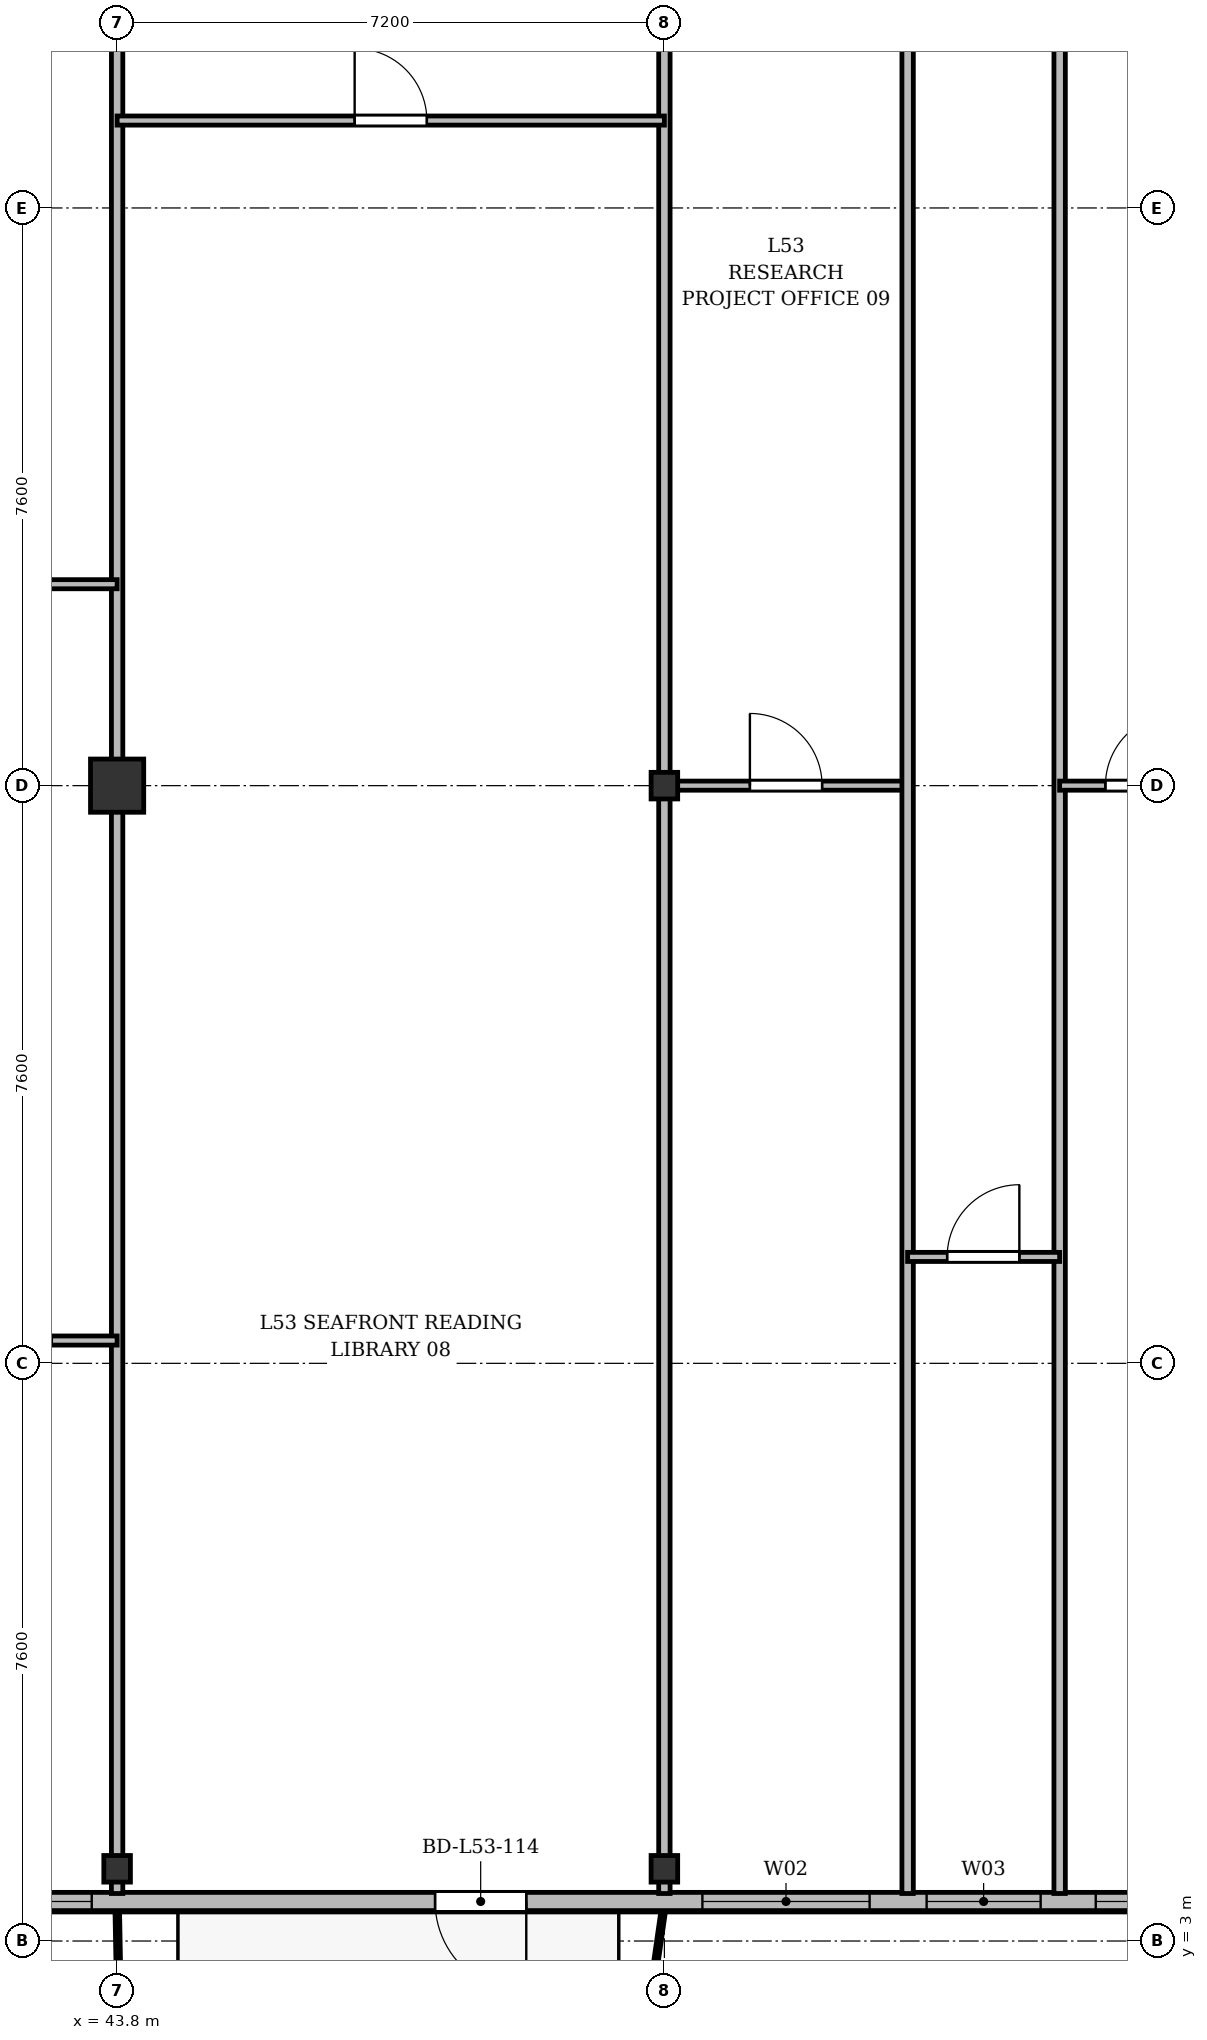
"""IFC4 building model, lengths in metres.
Left out: names, types, materials, properties, quantities, classifications, styles, units other than length and angle.
Written with IfcOpenShell. Run it as: python <this file> out.ifc"""

import sys

from ifc_helpers import new_model, si_unit, direction, frame, frame_2d, origin, origin_2d, place, context, subcontext, project, spatial, rectangle, i_section, extrude, source, transform, mapped, element, fill, save


model = new_model("IFC4")
c1 = context("Model", 3, precision=1e-05, world=origin(), true_north=direction((0.0, 1.0)))
c2 = subcontext(c1, "Body", "Model", "MODEL_VIEW")
j1 = project(units=[si_unit("LENGTHUNIT", "METRE"), si_unit("PLANEANGLEUNIT", "RADIAN")], contexts=[c1])
p1 = place(None, origin())
s1 = spatial("IfcSite", under=j1, at=p1, CompositionType="ELEMENT")
p2 = place(p1, origin())
s2 = spatial("IfcBuilding", under=s1, at=p2, CompositionType="ELEMENT")
p3 = place(p2, frame((0.0, 0.0, 204.9)))
s3 = spatial("IfcBuildingStorey", under=s2, at=p3, CompositionType="ELEMENT", Elevation=204.9)
m1 = source(origin(), c2, "Body", "SweptSolid", [
    extrude(i_section(OverallWidth=0.35, OverallDepth=0.35, WebThickness=0.018, FlangeThickness=0.028, at=origin_2d()), origin(), (0.0, 0.0, 1.0), 3.6),
])
p4 = place(p3, frame((43.8, 3.95, 0.0), z_axis=(0.0, 0.0, 1.0), x_axis=(1.0, 0.0, 0.0)))
e1 = element("IfcColumn", 1, at=p4, inside=s3, PredefinedType="COLUMN", context=c2, shape_type="MappedRepresentation", body=[
    mapped(m1, transform((0.0, 0.0, 0.0), x_axis=(1.0, 0.0, 0.0), y_axis=(0.0, 1.0, 0.0), z_axis=(0.0, 0.0, 1.0), scale=1.0)),
])
m2 = source(origin(), c2, "Body", "SweptSolid", [
    extrude(rectangle(XDim=0.7, YDim=0.7, at=origin_2d()), origin(), (0.0, 0.0, 1.0), 3.6),
])
p5 = place(p3, frame((43.8, 18.2, 0.0), z_axis=(0.0, 0.0, 1.0), x_axis=(1.0, 0.0, 0.0)))
e2 = element("IfcColumn", 2, at=p5, inside=s3, PredefinedType="COLUMN", context=c2, shape_type="MappedRepresentation", body=[
    mapped(m2, transform((0.0, 0.0, 0.0), x_axis=(1.0, 0.0, 0.0), y_axis=(0.0, 1.0, 0.0), z_axis=(0.0, 0.0, 1.0), scale=1.0)),
])
for number, where, z_axis, x_axis in (
    (3, (51.0, 3.95, 0.0), (0.0, 0.0, 1.0), (1.0, 0.0, 0.0)),
    (4, (51.0, 18.2, 0.0), (0.0, 0.0, 1.0), (1.0, 0.0, 0.0)),
):
    element("IfcColumn", number, at=place(p3, frame(where, z_axis=z_axis, x_axis=x_axis)), inside=s3, PredefinedType="COLUMN", context=c2, shape_type="MappedRepresentation", body=[
        mapped(m1, transform((0.0, 0.0, 0.0), x_axis=(1.0, 0.0, 0.0), y_axis=(0.0, 1.0, 0.0), z_axis=(0.0, 0.0, 1.0), scale=1.0)),
    ])
p6 = place(p3, frame((63.4, 3.52, 0.0), z_axis=(0.0, 0.0, 1.0), x_axis=(-1.0, 0.0, 0.0)))
e5 = element("IfcWall", 5, at=p6, inside=s3, PredefinedType="SOLIDWALL", context=c2, shape_type="SweptSolid", body=[
    extrude(rectangle(XDim=52.4, YDim=0.24, at=frame_2d((26.2, 0.0))), origin(), (0.0, 0.0, 1.0), 3.36),
])
p7 = place(p6, frame((1.345, 0.0, 0.9)))
e6 = element("IfcOpeningElement", 6, at=p7, cuts=e5, PredefinedType="OPENING", context=c2, shape_type="SweptSolid", body=[
    extrude(rectangle(XDim=2.0, YDim=1.95, at=frame_2d((1.0, 0.975))), frame((0.0, 0.13, 0.0), z_axis=(0.0, -1.0, 0.0), x_axis=(1.0, 0.0, 0.0)), (0.0, 0.0, 1.0), 0.26),
])
p8 = place(p6, frame((5.075, 0.0, 0.9)))
e7 = element("IfcOpeningElement", 7, at=p8, cuts=e5, PredefinedType="OPENING", context=c2, shape_type="SweptSolid", body=[
    extrude(rectangle(XDim=1.65, YDim=1.85, at=frame_2d((0.825, 0.925))), frame((0.0, 0.13, 0.0), z_axis=(0.0, -1.0, 0.0), x_axis=(1.0, 0.0, 0.0)), (0.0, 0.0, 1.0), 0.26),
])
p9 = place(p6, frame((7.45, 0.0, 0.9)))
e8 = element("IfcOpeningElement", 8, at=p9, cuts=e5, PredefinedType="OPENING", context=c2, shape_type="SweptSolid", body=[
    extrude(rectangle(XDim=1.5, YDim=1.75, at=frame_2d((0.75, 0.875))), frame((0.0, 0.13, 0.0), z_axis=(0.0, -1.0, 0.0), x_axis=(1.0, 0.0, 0.0)), (0.0, 0.0, 1.0), 0.26),
])
p10 = place(p6, frame((9.7, 0.0, 0.9)))
e9 = element("IfcOpeningElement", 9, at=p10, cuts=e5, PredefinedType="OPENING", context=c2, shape_type="SweptSolid", body=[
    extrude(rectangle(XDim=2.2, YDim=1.8, at=frame_2d((1.1, 0.9))), frame((0.0, 0.13, 0.0), z_axis=(0.0, -1.0, 0.0), x_axis=(1.0, 0.0, 0.0)), (0.0, 0.0, 1.0), 0.26),
])
p11 = place(p6, frame((14.217, 0.0, 0.0)))
e10 = element("IfcOpeningElement", 10, at=p11, cuts=e5, PredefinedType="OPENING", context=c2, shape_type="SweptSolid", body=[
    extrude(rectangle(XDim=1.2, YDim=2.2, at=frame_2d((0.6, 1.1))), frame((0.0, 0.13, 0.0), z_axis=(0.0, -1.0, 0.0), x_axis=(1.0, 0.0, 0.0)), (0.0, 0.0, 1.0), 0.26),
])
p12 = place(p6, frame((19.934, 0.0, 0.9)))
e11 = element("IfcOpeningElement", 11, at=p12, cuts=e5, PredefinedType="OPENING", context=c2, shape_type="SweptSolid", body=[
    extrude(rectangle(XDim=2.0, YDim=1.95, at=frame_2d((1.0, 0.975))), frame((0.0, 0.13, 0.0), z_axis=(0.0, -1.0, 0.0), x_axis=(1.0, 0.0, 0.0)), (0.0, 0.0, 1.0), 0.26),
])
p13 = place(p6, frame((22.775, 0.0, 0.9)))
e12 = element("IfcOpeningElement", 12, at=p13, cuts=e5, PredefinedType="OPENING", context=c2, shape_type="SweptSolid", body=[
    extrude(rectangle(XDim=1.65, YDim=1.85, at=frame_2d((0.825, 0.925))), frame((0.0, 0.13, 0.0), z_axis=(0.0, -1.0, 0.0), x_axis=(1.0, 0.0, 0.0)), (0.0, 0.0, 1.0), 0.26),
])
p14 = place(p6, frame((25.367, 0.0, 0.9)))
e13 = element("IfcOpeningElement", 13, at=p14, cuts=e5, PredefinedType="OPENING", context=c2, shape_type="SweptSolid", body=[
    extrude(rectangle(XDim=1.8, YDim=1.8, at=frame_2d((0.9, 0.9))), frame((0.0, 0.13, 0.0), z_axis=(0.0, -1.0, 0.0), x_axis=(1.0, 0.0, 0.0)), (0.0, 0.0, 1.0), 0.26),
])
p15 = place(p6, frame((29.1, 0.0, 0.9)))
e14 = element("IfcOpeningElement", 14, at=p15, cuts=e5, PredefinedType="OPENING", context=c2, shape_type="SweptSolid", body=[
    extrude(rectangle(XDim=2.2, YDim=1.8, at=frame_2d((1.1, 0.9))), frame((0.0, 0.13, 0.0), z_axis=(0.0, -1.0, 0.0), x_axis=(1.0, 0.0, 0.0)), (0.0, 0.0, 1.0), 0.26),
])
p16 = place(p6, frame((33.25, 0.0, 0.9)))
e15 = element("IfcOpeningElement", 15, at=p16, cuts=e5, PredefinedType="OPENING", context=c2, shape_type="SweptSolid", body=[
    extrude(rectangle(XDim=1.5, YDim=1.75, at=frame_2d((0.75, 0.875))), frame((0.0, 0.13, 0.0), z_axis=(0.0, -1.0, 0.0), x_axis=(1.0, 0.0, 0.0)), (0.0, 0.0, 1.0), 0.26),
])
p17 = place(p6, frame((35.65, 0.0, 0.9)))
e16 = element("IfcOpeningElement", 16, at=p17, cuts=e5, PredefinedType="OPENING", context=c2, shape_type="SweptSolid", body=[
    extrude(rectangle(XDim=1.5, YDim=1.75, at=frame_2d((0.75, 0.875))), frame((0.0, 0.13, 0.0), z_axis=(0.0, -1.0, 0.0), x_axis=(1.0, 0.0, 0.0)), (0.0, 0.0, 1.0), 0.26),
])
p18 = place(p6, frame((37.975, 0.0, 0.9)))
e17 = element("IfcOpeningElement", 17, at=p18, cuts=e5, PredefinedType="OPENING", context=c2, shape_type="SweptSolid", body=[
    extrude(rectangle(XDim=1.65, YDim=1.85, at=frame_2d((0.825, 0.925))), frame((0.0, 0.13, 0.0), z_axis=(0.0, -1.0, 0.0), x_axis=(1.0, 0.0, 0.0)), (0.0, 0.0, 1.0), 0.26),
])
p19 = place(p6, frame((41.456, 0.0, 0.0)))
e18 = element("IfcOpeningElement", 18, at=p19, cuts=e5, PredefinedType="OPENING", context=c2, shape_type="SweptSolid", body=[
    extrude(rectangle(XDim=1.2, YDim=2.2, at=frame_2d((0.6, 1.1))), frame((0.0, 0.13, 0.0), z_axis=(0.0, -1.0, 0.0), x_axis=(1.0, 0.0, 0.0)), (0.0, 0.0, 1.0), 0.26),
])
p20 = place(p6, frame((43.45, 0.0, 0.9)))
e19 = element("IfcOpeningElement", 19, at=p20, cuts=e5, PredefinedType="OPENING", context=c2, shape_type="SweptSolid", body=[
    extrude(rectangle(XDim=1.5, YDim=1.75, at=frame_2d((0.75, 0.875))), frame((0.0, 0.13, 0.0), z_axis=(0.0, -1.0, 0.0), x_axis=(1.0, 0.0, 0.0)), (0.0, 0.0, 1.0), 0.26),
])
p21 = place(p6, frame((45.75, 0.0, 0.9)))
e20 = element("IfcOpeningElement", 20, at=p21, cuts=e5, PredefinedType="OPENING", context=c2, shape_type="SweptSolid", body=[
    extrude(rectangle(XDim=1.5, YDim=1.75, at=frame_2d((0.75, 0.875))), frame((0.0, 0.13, 0.0), z_axis=(0.0, -1.0, 0.0), x_axis=(1.0, 0.0, 0.0)), (0.0, 0.0, 1.0), 0.26),
])
p22 = place(p6, frame((49.055, 0.0, 0.9)))
e21 = element("IfcOpeningElement", 21, at=p22, cuts=e5, PredefinedType="OPENING", context=c2, shape_type="SweptSolid", body=[
    extrude(rectangle(XDim=2.0, YDim=1.95, at=frame_2d((1.0, 0.975))), frame((0.0, 0.13, 0.0), z_axis=(0.0, -1.0, 0.0), x_axis=(1.0, 0.0, 0.0)), (0.0, 0.0, 1.0), 0.26),
])
for number, where, z_axis, x_axis in (
    (22, (43.8, 3.625, 0.0), (0.0, 0.0, 1.0), (0.0, 1.0, 0.0)),
    (23, (51.0, 3.625, 0.0), (0.0, 0.0, 1.0), (0.0, 1.0, 0.0)),
):
    element("IfcWall", number, at=place(p3, frame(where, z_axis=z_axis, x_axis=x_axis)), inside=s3, PredefinedType="PARTITIONING", context=c2, shape_type="SweptSolid", body=[
        extrude(rectangle(XDim=27.175, YDim=0.15, at=frame_2d((13.587, 0.0))), origin(), (0.0, 0.0, 1.0), 2.86),
    ])
p23 = place(p3, frame((35.8, 20.85, 0.0), z_axis=(0.0, 0.0, 1.0), x_axis=(1.0, 0.0, 0.0)))
e24 = element("IfcWall", 24, at=p23, inside=s3, PredefinedType="PARTITIONING", context=c2, shape_type="SweptSolid", body=[
    extrude(rectangle(XDim=8.0, YDim=0.12, at=frame_2d((4.0, 0.0))), origin(), (0.0, 0.0, 1.0), 2.86),
])
p24 = place(p23, frame((3.525, 0.0, 0.0)))
e25 = element("IfcOpeningElement", 25, at=p24, cuts=e24, PredefinedType="OPENING", context=c2, shape_type="SweptSolid", body=[
    extrude(rectangle(XDim=0.95, YDim=2.15, at=frame_2d((0.475, 1.075))), frame((0.0, 0.07, 0.0), z_axis=(0.0, -1.0, 0.0), x_axis=(1.0, 0.0, 0.0)), (0.0, 0.0, 1.0), 0.14),
])
p25 = place(p3, frame((41.133, 10.9, 0.0), z_axis=(0.0, 0.0, 1.0), x_axis=(1.0, 0.0, 0.0)))
e26 = element("IfcWall", 26, at=p25, inside=s3, PredefinedType="PARTITIONING", context=c2, shape_type="SweptSolid", body=[
    extrude(rectangle(XDim=2.667, YDim=0.12, at=frame_2d((1.333, 0.0))), origin(), (0.0, 0.0, 1.0), 2.86),
])
p26 = place(p25, frame((0.858, 0.0, 0.0)))
e27 = element("IfcOpeningElement", 27, at=p26, cuts=e26, PredefinedType="OPENING", context=c2, shape_type="SweptSolid", body=[
    extrude(rectangle(XDim=0.95, YDim=2.15, at=frame_2d((0.475, 1.075))), frame((0.0, 0.07, 0.0), z_axis=(0.0, -1.0, 0.0), x_axis=(1.0, 0.0, 0.0)), (0.0, 0.0, 1.0), 0.14),
])
p27 = place(p3, frame((43.8, 26.95, 0.0), z_axis=(0.0, 0.0, 1.0), x_axis=(1.0, 0.0, 0.0)))
e28 = element("IfcWall", 28, at=p27, inside=s3, PredefinedType="PARTITIONING", context=c2, shape_type="SweptSolid", body=[
    extrude(rectangle(XDim=7.2, YDim=0.12, at=frame_2d((3.6, 0.0))), origin(), (0.0, 0.0, 1.0), 2.86),
])
p28 = place(p27, frame((3.125, 0.0, 0.0)))
e29 = element("IfcOpeningElement", 29, at=p28, cuts=e28, PredefinedType="OPENING", context=c2, shape_type="SweptSolid", body=[
    extrude(rectangle(XDim=0.95, YDim=2.15, at=frame_2d((0.475, 1.075))), frame((0.0, 0.07, 0.0), z_axis=(0.0, -1.0, 0.0), x_axis=(1.0, 0.0, 0.0)), (0.0, 0.0, 1.0), 0.14),
])
p29 = place(p3, frame((51.0, 18.2, 0.0), z_axis=(0.0, 0.0, 1.0), x_axis=(1.0, 0.0, 0.0)))
e30 = element("IfcWall", 30, at=p29, inside=s3, PredefinedType="PARTITIONING", context=c2, shape_type="SweptSolid", body=[
    extrude(rectangle(XDim=3.2, YDim=0.12, at=frame_2d((1.6, 0.0))), origin(), (0.0, 0.0, 1.0), 2.91),
])
p30 = place(p29, frame((1.125, 0.0, 0.0)))
e31 = element("IfcOpeningElement", 31, at=p30, cuts=e30, PredefinedType="OPENING", context=c2, shape_type="SweptSolid", body=[
    extrude(rectangle(XDim=0.95, YDim=2.15, at=frame_2d((0.475, 1.075))), frame((0.0, 0.07, 0.0), z_axis=(0.0, -1.0, 0.0), x_axis=(1.0, 0.0, 0.0)), (0.0, 0.0, 1.0), 0.14),
])
for number, where, z_axis, x_axis in (
    (32, (54.2, 3.625, 0.0), (0.0, 0.0, 1.0), (0.0, 1.0, 0.0)),
    (33, (56.2, 3.625, 0.0), (0.0, 0.0, 1.0), (0.0, 1.0, 0.0)),
):
    element("IfcWall", number, at=place(p3, frame(where, z_axis=z_axis, x_axis=x_axis)), inside=s3, PredefinedType="PARTITIONING", context=c2, shape_type="SweptSolid", body=[
        extrude(rectangle(XDim=27.175, YDim=0.15, at=frame_2d((13.587, 0.0))), origin(), (0.0, 0.0, 1.0), 2.91),
    ])
p31 = place(p3, frame((54.2, 12.0, 0.0), z_axis=(0.0, 0.0, 1.0), x_axis=(1.0, 0.0, 0.0)))
e34 = element("IfcWall", 34, at=p31, inside=s3, PredefinedType="PARTITIONING", context=c2, shape_type="SweptSolid", body=[
    extrude(rectangle(XDim=2.0, YDim=0.12, at=frame_2d((1.0, 0.0))), origin(), (0.0, 0.0, 1.0), 3.36),
])
p32 = place(p31, frame((0.52, 0.0, 0.0)))
e35 = element("IfcOpeningElement", 35, at=p32, cuts=e34, PredefinedType="OPENING", context=c2, shape_type="SweptSolid", body=[
    extrude(rectangle(XDim=0.95, YDim=2.15, at=frame_2d((0.475, 1.075))), frame((0.0, 0.07, 0.0), z_axis=(0.0, -1.0, 0.0), x_axis=(1.0, 0.0, 0.0)), (0.0, 0.0, 1.0), 0.14),
])
p33 = place(p3, frame((56.2, 18.2, 0.0), z_axis=(0.0, 0.0, 1.0), x_axis=(1.0, 0.0, 0.0)))
e36 = element("IfcWall", 36, at=p33, inside=s3, PredefinedType="PARTITIONING", context=c2, shape_type="SweptSolid", body=[
    extrude(rectangle(XDim=2.6, YDim=0.12, at=frame_2d((1.3, 0.0))), origin(), (0.0, 0.0, 1.0), 2.91),
])
p34 = place(p33, frame((0.602, 0.0, 0.0)))
e37 = element("IfcOpeningElement", 37, at=p34, cuts=e36, PredefinedType="OPENING", context=c2, shape_type="SweptSolid", body=[
    extrude(rectangle(XDim=0.95, YDim=2.15, at=frame_2d((0.475, 1.075))), frame((0.0, 0.07, 0.0), z_axis=(0.0, -1.0, 0.0), x_axis=(1.0, 0.0, 0.0)), (0.0, 0.0, 1.0), 0.14),
])
m3 = source(origin(), c2, "Body", "SweptSolid", [
    extrude(rectangle(XDim=1.65, YDim=1.85, at=frame_2d((0.825, 0.925))), frame((0.0, 0.03, 0.0), z_axis=(0.0, -1.0, 0.0), x_axis=(1.0, 0.0, 0.0)), (0.0, 0.0, 1.0), 0.06),
])
p35 = place(p8, origin())
e38 = element("IfcWindow", 38, at=p35, inside=s3, PartitioningType="SINGLE_PANEL", PredefinedType="WINDOW", context=c2, shape_type="MappedRepresentation", body=[
    mapped(m3, transform((0.0, 0.0, 0.0), x_axis=(1.0, 0.0, 0.0), y_axis=(0.0, 1.0, 0.0), z_axis=(0.0, 0.0, 1.0), scale=1.0)),
])
fill(e7, e38)
m4 = source(origin(), c2, "Body", "SweptSolid", [
    extrude(rectangle(XDim=1.5, YDim=1.75, at=frame_2d((0.75, 0.875))), frame((0.0, 0.03, 0.0), z_axis=(0.0, -1.0, 0.0), x_axis=(1.0, 0.0, 0.0)), (0.0, 0.0, 1.0), 0.06),
])
p36 = place(p9, origin())
e39 = element("IfcWindow", 39, at=p36, inside=s3, PartitioningType="SINGLE_PANEL", PredefinedType="WINDOW", context=c2, shape_type="MappedRepresentation", body=[
    mapped(m4, transform((0.0, 0.0, 0.0), x_axis=(1.0, 0.0, 0.0), y_axis=(0.0, 1.0, 0.0), z_axis=(0.0, 0.0, 1.0), scale=1.0)),
])
fill(e8, e39)
m5 = source(origin(), c2, "Body", "SweptSolid", [
    extrude(rectangle(XDim=2.2, YDim=1.8, at=frame_2d((1.1, 0.9))), frame((0.0, 0.03, 0.0), z_axis=(0.0, -1.0, 0.0), x_axis=(1.0, 0.0, 0.0)), (0.0, 0.0, 1.0), 0.06),
])
p37 = place(p10, origin())
e40 = element("IfcWindow", 40, at=p37, inside=s3, PartitioningType="SINGLE_PANEL", PredefinedType="WINDOW", context=c2, shape_type="MappedRepresentation", body=[
    mapped(m5, transform((0.0, 0.0, 0.0), x_axis=(1.0, 0.0, 0.0), y_axis=(0.0, 1.0, 0.0), z_axis=(0.0, 0.0, 1.0), scale=1.0)),
])
fill(e9, e40)
m6 = source(origin(), c2, "Body", "SweptSolid", [
    extrude(rectangle(XDim=1.2, YDim=2.2, at=frame_2d((0.6, 1.1))), frame((0.0, 0.025, 0.0), z_axis=(0.0, -1.0, 0.0), x_axis=(1.0, 0.0, 0.0)), (0.0, 0.0, 1.0), 0.05),
])
p38 = place(p11, origin())
e41 = element("IfcDoor", 41, at=p38, inside=s3, OperationType="SINGLE_SWING_LEFT", PredefinedType="DOOR", context=c2, shape_type="MappedRepresentation", body=[
    mapped(m6, transform((0.0, 0.0, 0.0), x_axis=(1.0, 0.0, 0.0), y_axis=(0.0, 1.0, 0.0), z_axis=(0.0, 0.0, 1.0), scale=1.0)),
])
fill(e10, e41)
m7 = source(origin(), c2, "Body", "SweptSolid", [
    extrude(rectangle(XDim=2.0, YDim=1.95, at=frame_2d((1.0, 0.975))), frame((0.0, 0.03, 0.0), z_axis=(0.0, -1.0, 0.0), x_axis=(1.0, 0.0, 0.0)), (0.0, 0.0, 1.0), 0.06),
])
p39 = place(p12, origin())
e42 = element("IfcWindow", 42, at=p39, inside=s3, PartitioningType="SINGLE_PANEL", PredefinedType="WINDOW", context=c2, shape_type="MappedRepresentation", body=[
    mapped(m7, transform((0.0, 0.0, 0.0), x_axis=(1.0, 0.0, 0.0), y_axis=(0.0, 1.0, 0.0), z_axis=(0.0, 0.0, 1.0), scale=1.0)),
])
fill(e11, e42)
m8 = source(origin(), c2, "Body", "SweptSolid", [
    extrude(rectangle(XDim=0.95, YDim=2.15, at=frame_2d((0.475, 1.075))), frame((0.0, 0.025, 0.0), z_axis=(0.0, -1.0, 0.0), x_axis=(1.0, 0.0, 0.0)), (0.0, 0.0, 1.0), 0.05),
])
p40 = place(p28, origin())
e43 = element("IfcDoor", 43, at=p40, inside=s3, OperationType="SINGLE_SWING_LEFT", PredefinedType="DOOR", context=c2, shape_type="MappedRepresentation", body=[
    mapped(m8, transform((0.0, 0.0, 0.0), x_axis=(1.0, 0.0, 0.0), y_axis=(0.0, 1.0, 0.0), z_axis=(0.0, 0.0, 1.0), scale=1.0)),
])
fill(e29, e43)
p41 = place(p30, origin())
e44 = element("IfcDoor", 44, at=p41, inside=s3, OperationType="SINGLE_SWING_LEFT", PredefinedType="DOOR", context=c2, shape_type="MappedRepresentation", body=[
    mapped(m8, transform((0.0, 0.0, 0.0), x_axis=(1.0, 0.0, 0.0), y_axis=(0.0, 1.0, 0.0), z_axis=(0.0, 0.0, 1.0), scale=1.0)),
])
fill(e31, e44)
p42 = place(p32, origin())
e45 = element("IfcDoor", 45, at=p42, inside=s3, OperationType="SINGLE_SWING_RIGHT", PredefinedType="DOOR", context=c2, shape_type="MappedRepresentation", body=[
    mapped(m8, transform((0.0, 0.0, 0.0), x_axis=(1.0, 0.0, 0.0), y_axis=(0.0, 1.0, 0.0), z_axis=(0.0, 0.0, 1.0), scale=1.0)),
])
fill(e35, e45)
p43 = place(p34, origin())
e46 = element("IfcDoor", 46, at=p43, inside=s3, OperationType="SINGLE_SWING_RIGHT", PredefinedType="DOOR", context=c2, shape_type="MappedRepresentation", body=[
    mapped(m8, transform((0.0, 0.0, 0.0), x_axis=(1.0, 0.0, 0.0), y_axis=(0.0, 1.0, 0.0), z_axis=(0.0, 0.0, 1.0), scale=1.0)),
])
fill(e37, e46)
save(model, sys.argv[1])
